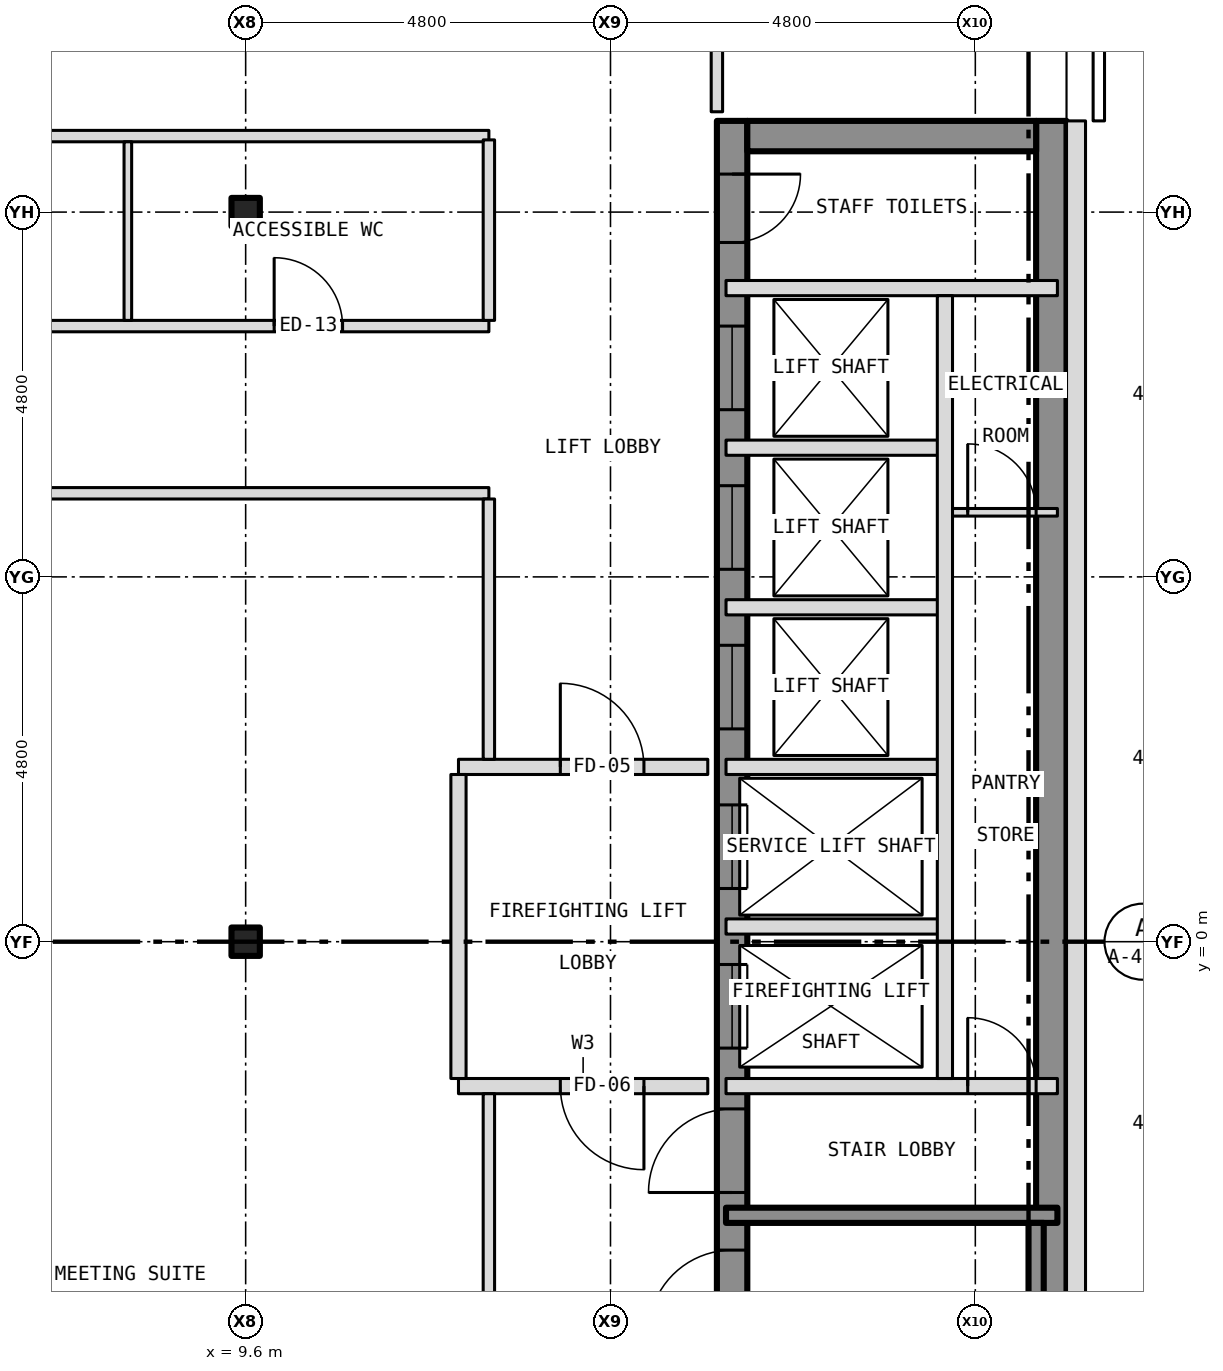
"""IFC4 building model, lengths in metres.
Left out: names, types, materials, properties, quantities, classifications, styles, units other than length and angle.
Written with IfcOpenShell. Run it as: python <this file> out.ifc"""

import sys

from ifc_helpers import new_model, si_unit, direction, frame, frame_2d, origin, origin_2d, place, context, subcontext, project, spatial, rectangle, i_section, extrude, element, fill, save


model = new_model("IFC4")
c1 = context("Model", 3, precision=1e-05, world=origin(), true_north=direction((0.0, 1.0)))
c2 = subcontext(c1, "Body", "Model", "MODEL_VIEW")
j1 = project(units=[si_unit("LENGTHUNIT", "METRE"), si_unit("PLANEANGLEUNIT", "RADIAN")], contexts=[c1])
p1 = place(None, origin())
s1 = spatial("IfcSite", under=j1, at=p1, CompositionType="ELEMENT")
p2 = place(p1, origin())
s2 = spatial("IfcBuilding", under=s1, at=p2, CompositionType="ELEMENT")
p3 = place(p2, frame((0.0, 0.0, 208.5)))
s3 = spatial("IfcBuildingStorey", under=s2, at=p3, CompositionType="ELEMENT", Elevation=208.5)
for number, where, z_axis, x_axis in (
    (1, (9.6, 0.0, -0.15), (0.0, 0.0, 1.0), (1.0, 0.0, 0.0)),
    (2, (9.6, 9.6, -0.15), (0.0, 0.0, 1.0), (1.0, 0.0, 0.0)),
):
    element("IfcColumn", number, at=place(p3, frame(where, z_axis=z_axis, x_axis=x_axis)), inside=s3, PredefinedType="COLUMN", context=c2, shape_type="SweptSolid", body=[
        extrude(i_section(OverallWidth=0.373, OverallDepth=0.373, WebThickness=0.016, FlangeThickness=0.026, at=origin_2d()), origin(), (0.0, 0.0, 1.0), 3.5),
    ])
p4 = place(p3, frame((16.0, -10.8, 0.0), z_axis=(0.0, 0.0, 1.0), x_axis=(0.0, 1.0, 0.0)))
e3 = element("IfcWall", 3, at=p4, inside=s3, PredefinedType="SHEAR", context=c2, shape_type="SweptSolid", body=[
    extrude(rectangle(XDim=21.6, YDim=0.4, at=frame_2d((10.8, 0.0))), origin(), (0.0, 0.0, 1.0), 3.25),
])
p5 = place(p4, frame((9.4, 0.0, 0.0)))
e4 = element("IfcOpeningElement", 4, at=p5, cuts=e3, PredefinedType="OPENING", context=c2, shape_type="SweptSolid", body=[
    extrude(rectangle(XDim=1.1, YDim=2.1, at=frame_2d((0.55, 1.05))), frame((0.0, 0.212, 0.0), z_axis=(0.0, -1.0, 0.0), x_axis=(1.0, 0.0, 0.0)), (0.0, 0.0, 1.0), 0.424),
])
p6 = place(p4, frame((11.5, 0.0, 0.0)))
e5 = element("IfcOpeningElement", 5, at=p6, cuts=e3, PredefinedType="OPENING", context=c2, shape_type="SweptSolid", body=[
    extrude(rectangle(XDim=1.1, YDim=2.1, at=frame_2d((0.55, 1.05))), frame((0.0, 0.212, 0.0), z_axis=(0.0, -1.0, 0.0), x_axis=(1.0, 0.0, 0.0)), (0.0, 0.0, 1.0), 0.424),
])
p7 = place(p4, frame((13.6, 0.0, 0.0)))
e6 = element("IfcOpeningElement", 6, at=p7, cuts=e3, PredefinedType="OPENING", context=c2, shape_type="SweptSolid", body=[
    extrude(rectangle(XDim=1.1, YDim=2.1, at=frame_2d((0.55, 1.05))), frame((0.0, 0.212, 0.0), z_axis=(0.0, -1.0, 0.0), x_axis=(1.0, 0.0, 0.0)), (0.0, 0.0, 1.0), 0.424),
])
p8 = place(p4, frame((15.7, 0.0, 0.0)))
e7 = element("IfcOpeningElement", 7, at=p8, cuts=e3, PredefinedType="OPENING", context=c2, shape_type="SweptSolid", body=[
    extrude(rectangle(XDim=1.1, YDim=2.1, at=frame_2d((0.55, 1.05))), frame((0.0, 0.212, 0.0), z_axis=(0.0, -1.0, 0.0), x_axis=(1.0, 0.0, 0.0)), (0.0, 0.0, 1.0), 0.424),
])
p9 = place(p4, frame((17.8, 0.0, 0.0)))
e8 = element("IfcOpeningElement", 8, at=p9, cuts=e3, PredefinedType="OPENING", context=c2, shape_type="SweptSolid", body=[
    extrude(rectangle(XDim=1.1, YDim=2.1, at=frame_2d((0.55, 1.05))), frame((0.0, 0.212, 0.0), z_axis=(0.0, -1.0, 0.0), x_axis=(1.0, 0.0, 0.0)), (0.0, 0.0, 1.0), 0.424),
])
p10 = place(p4, frame((5.642, 0.0, 0.0)))
e9 = element("IfcOpeningElement", 9, at=p10, cuts=e3, PredefinedType="OPENING", context=c2, shape_type="SweptSolid", body=[
    extrude(rectangle(XDim=1.1, YDim=2.1, at=frame_2d((0.55, 1.05))), frame((0.0, 0.212, 0.0), z_axis=(0.0, -1.0, 0.0), x_axis=(1.0, 0.0, 0.0)), (0.0, 0.0, 1.0), 0.424),
])
p11 = place(p4, frame((7.5, 0.0, 0.0)))
e10 = element("IfcOpeningElement", 10, at=p11, cuts=e3, PredefinedType="OPENING", context=c2, shape_type="SweptSolid", body=[
    extrude(rectangle(XDim=1.1, YDim=2.1, at=frame_2d((0.55, 1.05))), frame((0.0, 0.212, 0.0), z_axis=(0.0, -1.0, 0.0), x_axis=(1.0, 0.0, 0.0)), (0.0, 0.0, 1.0), 0.424),
])
p12 = place(p4, frame((20.0, 0.0, 0.0)))
e11 = element("IfcOpeningElement", 11, at=p12, cuts=e3, PredefinedType="OPENING", context=c2, shape_type="SweptSolid", body=[
    extrude(rectangle(XDim=0.9, YDim=2.1, at=frame_2d((0.45, 1.05))), frame((0.0, 0.212, 0.0), z_axis=(0.0, -1.0, 0.0), x_axis=(1.0, 0.0, 0.0)), (0.0, 0.0, 1.0), 0.424),
])
p13 = place(p3, frame((20.2, -10.8, 0.0), z_axis=(0.0, 0.0, 1.0), x_axis=(0.0, 1.0, 0.0)))
e12 = element("IfcWall", 12, at=p13, inside=s3, PredefinedType="SHEAR", context=c2, shape_type="SweptSolid", body=[
    extrude(rectangle(XDim=21.6, YDim=0.4, at=frame_2d((10.8, 0.0))), origin(), (0.0, 0.0, 1.0), 3.25),
])
p14 = place(p3, frame((16.2, 10.6, 0.0), z_axis=(0.0, 0.0, 1.0), x_axis=(1.0, 0.0, 0.0)))
e13 = element("IfcWall", 13, at=p14, inside=s3, PredefinedType="SHEAR", context=c2, shape_type="SweptSolid", body=[
    extrude(rectangle(XDim=3.8, YDim=0.4, at=frame_2d((1.9, 0.0))), origin(), (0.0, 0.0, 1.0), 3.25),
])
p15 = place(p3, frame((20.525, -10.8, 0.0), z_axis=(0.0, 0.0, 1.0), x_axis=(0.0, 1.0, 0.0)))
e14 = element("IfcWall", 14, at=p15, inside=s3, PredefinedType="SOLIDWALL", context=c2, shape_type="SweptSolid", body=[
    extrude(rectangle(XDim=21.6, YDim=0.25, at=frame_2d((10.8, 0.0))), origin(), (0.0, 0.0, 1.0), 3.5),
])
p16 = place(p15, frame((2.95, 0.0, 1.0)))
e15 = element("IfcOpeningElement", 15, at=p16, cuts=e14, PredefinedType="OPENING", context=c2, shape_type="SweptSolid", body=[
    extrude(rectangle(XDim=0.6, YDim=1.5, at=frame_2d((0.3, 0.75))), frame((0.0, 0.137, 0.0), z_axis=(0.0, -1.0, 0.0), x_axis=(1.0, 0.0, 0.0)), (0.0, 0.0, 1.0), 0.274),
])
p17 = place(p3, frame((15.92, -3.6, 0.0), z_axis=(0.0, 0.0, 1.0), x_axis=(1.0, 0.0, 0.0)))
e16 = element("IfcWall", 16, at=p17, inside=s3, PredefinedType="SHEAR", context=c2, shape_type="SweptSolid", body=[
    extrude(rectangle(XDim=4.36, YDim=0.2, at=frame_2d((2.18, 0.0))), origin(), (0.0, 0.0, 1.0), 3.25),
])
p18 = place(p3, frame((12.4, -1.9, 0.0), z_axis=(0.0, 0.0, 1.0), x_axis=(1.0, 0.0, 0.0)))
e17 = element("IfcWall", 17, at=p18, inside=s3, PredefinedType="PARTITIONING", context=c2, shape_type="SweptSolid", body=[
    extrude(rectangle(XDim=3.28, YDim=0.2, at=frame_2d((1.64, 0.0))), origin(), (0.0, 0.0, 1.0), 3.35),
])
p19 = place(p18, frame((1.34, 0.0, 0.0)))
e18 = element("IfcOpeningElement", 18, at=p19, cuts=e17, PredefinedType="OPENING", context=c2, shape_type="SweptSolid", body=[
    extrude(rectangle(XDim=1.1, YDim=2.1, at=frame_2d((0.55, 1.05))), frame((0.0, 0.112, 0.0), z_axis=(0.0, -1.0, 0.0), x_axis=(1.0, 0.0, 0.0)), (0.0, 0.0, 1.0), 0.224),
])
p20 = place(p3, frame((15.92, -1.9, 0.0), z_axis=(0.0, 0.0, 1.0), x_axis=(1.0, 0.0, 0.0)))
e19 = element("IfcWall", 19, at=p20, inside=s3, PredefinedType="PARTITIONING", context=c2, shape_type="SweptSolid", body=[
    extrude(rectangle(XDim=4.36, YDim=0.2, at=frame_2d((2.18, 0.0))), origin(), (0.0, 0.0, 1.0), 3.25),
])
p21 = place(p20, frame((3.18, 0.0, 0.0)))
e20 = element("IfcOpeningElement", 20, at=p21, cuts=e19, PredefinedType="OPENING", context=c2, shape_type="SweptSolid", body=[
    extrude(rectangle(XDim=0.9, YDim=2.1, at=frame_2d((0.45, 1.05))), frame((0.0, 0.112, 0.0), z_axis=(0.0, -1.0, 0.0), x_axis=(1.0, 0.0, 0.0)), (0.0, 0.0, 1.0), 0.224),
])
p22 = place(p3, frame((15.92, 0.2, 0.0), z_axis=(0.0, 0.0, 1.0), x_axis=(1.0, 0.0, 0.0)))
e21 = element("IfcWall", 21, at=p22, inside=s3, PredefinedType="PARTITIONING", context=c2, shape_type="SweptSolid", body=[
    extrude(rectangle(XDim=2.88, YDim=0.2, at=frame_2d((1.44, 0.0))), origin(), (0.0, 0.0, 1.0), 3.25),
])
p23 = place(p3, frame((12.4, 2.3, 0.0), z_axis=(0.0, 0.0, 1.0), x_axis=(1.0, 0.0, 0.0)))
e22 = element("IfcWall", 22, at=p23, inside=s3, PredefinedType="PARTITIONING", context=c2, shape_type="SweptSolid", body=[
    extrude(rectangle(XDim=3.28, YDim=0.2, at=frame_2d((1.64, 0.0))), origin(), (0.0, 0.0, 1.0), 3.35),
])
p24 = place(p23, frame((1.34, 0.0, 0.0)))
e23 = element("IfcOpeningElement", 23, at=p24, cuts=e22, PredefinedType="OPENING", context=c2, shape_type="SweptSolid", body=[
    extrude(rectangle(XDim=1.1, YDim=2.1, at=frame_2d((0.55, 1.05))), frame((0.0, 0.112, 0.0), z_axis=(0.0, -1.0, 0.0), x_axis=(1.0, 0.0, 0.0)), (0.0, 0.0, 1.0), 0.224),
])
for number, where, z_axis, x_axis in (
    (24, (15.92, 2.3, 0.0), (0.0, 0.0, 1.0), (1.0, 0.0, 0.0)),
    (25, (15.92, 4.4, 0.0), (0.0, 0.0, 1.0), (1.0, 0.0, 0.0)),
):
    element("IfcWall", number, at=place(p3, frame(where, z_axis=z_axis, x_axis=x_axis)), inside=s3, PredefinedType="PARTITIONING", context=c2, shape_type="SweptSolid", body=[
        extrude(rectangle(XDim=2.88, YDim=0.2, at=frame_2d((1.44, 0.0))), origin(), (0.0, 0.0, 1.0), 3.25),
    ])
p25 = place(p3, frame((18.8, 5.65, 0.0), z_axis=(0.0, 0.0, 1.0), x_axis=(1.0, 0.0, 0.0)))
e26 = element("IfcWall", 26, at=p25, inside=s3, PredefinedType="PARTITIONING", context=c2, shape_type="SweptSolid", body=[
    extrude(rectangle(XDim=1.48, YDim=0.1, at=frame_2d((0.74, 0.0))), origin(), (0.0, 0.0, 1.0), 3.25),
])
p26 = place(p25, frame((0.3, 0.0, 0.0)))
e27 = element("IfcOpeningElement", 27, at=p26, cuts=e26, PredefinedType="OPENING", context=c2, shape_type="SweptSolid", body=[
    extrude(rectangle(XDim=0.9, YDim=2.1, at=frame_2d((0.45, 1.05))), frame((0.0, 0.062, 0.0), z_axis=(0.0, -1.0, 0.0), x_axis=(1.0, 0.0, 0.0)), (0.0, 0.0, 1.0), 0.124),
])
p27 = place(p3, frame((3.3, 5.9, 0.0), z_axis=(0.0, 0.0, 1.0), x_axis=(1.0, 0.0, 0.0)))
e28 = element("IfcWall", 28, at=p27, inside=s3, PredefinedType="PARTITIONING", context=c2, shape_type="SweptSolid", body=[
    extrude(rectangle(XDim=9.5, YDim=0.15, at=frame_2d((4.75, 0.0))), origin(), (0.0, 0.0, 1.0), 3.35),
])
p28 = place(p3, frame((15.92, 6.5, 0.0), z_axis=(0.0, 0.0, 1.0), x_axis=(1.0, 0.0, 0.0)))
e29 = element("IfcWall", 29, at=p28, inside=s3, PredefinedType="PARTITIONING", context=c2, shape_type="SweptSolid", body=[
    extrude(rectangle(XDim=2.88, YDim=0.2, at=frame_2d((1.44, 0.0))), origin(), (0.0, 0.0, 1.0), 3.25),
])
p29 = place(p3, frame((3.3, 8.1, 0.0), z_axis=(0.0, 0.0, 1.0), x_axis=(1.0, 0.0, 0.0)))
e30 = element("IfcWall", 30, at=p29, inside=s3, PredefinedType="PARTITIONING", context=c2, shape_type="SweptSolid", body=[
    extrude(rectangle(XDim=9.5, YDim=0.15, at=frame_2d((4.75, 0.0))), origin(), (0.0, 0.0, 1.0), 3.35),
])
p30 = place(p29, frame((6.675, 0.0, 0.0)))
e31 = element("IfcOpeningElement", 31, at=p30, cuts=e30, PredefinedType="OPENING", context=c2, shape_type="SweptSolid", body=[
    extrude(rectangle(XDim=0.9, YDim=2.1, at=frame_2d((0.45, 1.05))), frame((0.0, 0.087, 0.0), z_axis=(0.0, -1.0, 0.0), x_axis=(1.0, 0.0, 0.0)), (0.0, 0.0, 1.0), 0.174),
])
p31 = place(p3, frame((15.92, 8.6, 0.0), z_axis=(0.0, 0.0, 1.0), x_axis=(1.0, 0.0, 0.0)))
e32 = element("IfcWall", 32, at=p31, inside=s3, PredefinedType="PARTITIONING", context=c2, shape_type="SweptSolid", body=[
    extrude(rectangle(XDim=4.36, YDim=0.2, at=frame_2d((2.18, 0.0))), origin(), (0.0, 0.0, 1.0), 3.25),
])
p32 = place(p3, frame((3.3, 10.6, 0.0), z_axis=(0.0, 0.0, 1.0), x_axis=(1.0, 0.0, 0.0)))
e33 = element("IfcWall", 33, at=p32, inside=s3, PredefinedType="PARTITIONING", context=c2, shape_type="SweptSolid", body=[
    extrude(rectangle(XDim=9.5, YDim=0.15, at=frame_2d((4.75, 0.0))), origin(), (0.0, 0.0, 1.0), 3.35),
])
p33 = place(p32, frame((1.925, 0.0, 0.0)))
e34 = element("IfcOpeningElement", 34, at=p33, cuts=e33, PredefinedType="OPENING", context=c2, shape_type="SweptSolid", body=[
    extrude(rectangle(XDim=0.9, YDim=2.1, at=frame_2d((0.45, 1.05))), frame((0.0, 0.087, 0.0), z_axis=(0.0, -1.0, 0.0), x_axis=(1.0, 0.0, 0.0)), (0.0, 0.0, 1.0), 0.174),
])
p34 = place(p3, frame((8.05, 8.175, 0.0), z_axis=(0.0, 0.0, 1.0), x_axis=(0.0, 1.0, 0.0)))
e35 = element("IfcWall", 35, at=p34, inside=s3, PredefinedType="PARTITIONING", context=c2, shape_type="SweptSolid", body=[
    extrude(rectangle(XDim=2.35, YDim=0.1, at=frame_2d((1.175, 0.0))), origin(), (0.0, 0.0, 1.0), 3.35),
])
p35 = place(p3, frame((12.4, -1.8, 0.0), z_axis=(0.0, 0.0, 1.0), x_axis=(0.0, 1.0, 0.0)))
e36 = element("IfcWall", 36, at=p35, inside=s3, PredefinedType="PARTITIONING", context=c2, shape_type="SweptSolid", body=[
    extrude(rectangle(XDim=4.0, YDim=0.2, at=frame_2d((2.0, 0.0))), origin(), (0.0, 0.0, 1.0), 3.35),
])
p36 = place(p3, frame((12.8, -10.525, 0.0), z_axis=(0.0, 0.0, 1.0), x_axis=(0.0, 1.0, 0.0)))
e37 = element("IfcWall", 37, at=p36, inside=s3, PredefinedType="PARTITIONING", context=c2, shape_type="SweptSolid", body=[
    extrude(rectangle(XDim=8.525, YDim=0.15, at=frame_2d((4.262, 0.0))), origin(), (0.0, 0.0, 1.0), 3.35),
])
p37 = place(p3, frame((12.8, 2.4, 0.0), z_axis=(0.0, 0.0, 1.0), x_axis=(0.0, 1.0, 0.0)))
e38 = element("IfcWall", 38, at=p37, inside=s3, PredefinedType="PARTITIONING", context=c2, shape_type="SweptSolid", body=[
    extrude(rectangle(XDim=3.425, YDim=0.15, at=frame_2d((1.712, 0.0))), origin(), (0.0, 0.0, 1.0), 3.35),
])
p38 = place(p3, frame((12.8, 8.175, 0.0), z_axis=(0.0, 0.0, 1.0), x_axis=(0.0, 1.0, 0.0)))
e39 = element("IfcWall", 39, at=p38, inside=s3, PredefinedType="PARTITIONING", context=c2, shape_type="SweptSolid", body=[
    extrude(rectangle(XDim=2.375, YDim=0.15, at=frame_2d((1.188, 0.0))), origin(), (0.0, 0.0, 1.0), 3.35),
])
p39 = place(p3, frame((15.8, 10.92, 0.0), z_axis=(0.0, 0.0, 1.0), x_axis=(0.0, 1.0, 0.0)))
e40 = element("IfcWall", 40, at=p39, inside=s3, PredefinedType="PARTITIONING", context=c2, shape_type="SweptSolid", body=[
    extrude(rectangle(XDim=1.805, YDim=0.15, at=frame_2d((0.903, 0.0))), origin(), (0.0, 0.0, 1.0), 3.35),
])
p40 = place(p3, frame((18.8, -1.8, 0.0), z_axis=(0.0, 0.0, 1.0), x_axis=(0.0, 1.0, 0.0)))
e41 = element("IfcWall", 41, at=p40, inside=s3, PredefinedType="PARTITIONING", context=c2, shape_type="SweptSolid", body=[
    extrude(rectangle(XDim=10.3, YDim=0.2, at=frame_2d((5.15, 0.0))), origin(), (0.0, 0.0, 1.0), 3.25),
])
p41 = place(p3, frame((20.0, -10.68, 0.0), z_axis=(0.0, 0.0, 1.0), x_axis=(0.0, 1.0, 0.0)))
e42 = element("IfcWall", 42, at=p41, inside=s3, PredefinedType="SHEAR", context=c2, shape_type="SweptSolid", body=[
    extrude(rectangle(XDim=6.98, YDim=0.2, at=frame_2d((3.49, 0.0))), origin(), (0.0, 0.0, 1.0), 3.25),
])
p42 = place(p5, origin())
e43 = element("IfcDoor", 43, at=p42, inside=s3, OperationType="SLIDING_TO_LEFT", PredefinedType="DOOR", context=c2, shape_type="SweptSolid", body=[
    extrude(rectangle(XDim=1.1, YDim=2.1, at=frame_2d((0.55, 1.05))), frame((0.0, 0.025, 0.0), z_axis=(0.0, -1.0, 0.0), x_axis=(1.0, 0.0, 0.0)), (0.0, 0.0, 1.0), 0.05),
])
fill(e4, e43)
p43 = place(p6, origin())
e44 = element("IfcDoor", 44, at=p43, inside=s3, OperationType="SLIDING_TO_LEFT", PredefinedType="DOOR", context=c2, shape_type="SweptSolid", body=[
    extrude(rectangle(XDim=1.1, YDim=2.1, at=frame_2d((0.55, 1.05))), frame((0.0, 0.025, 0.0), z_axis=(0.0, -1.0, 0.0), x_axis=(1.0, 0.0, 0.0)), (0.0, 0.0, 1.0), 0.05),
])
fill(e5, e44)
p44 = place(p7, origin())
e45 = element("IfcDoor", 45, at=p44, inside=s3, OperationType="SLIDING_TO_LEFT", PredefinedType="DOOR", context=c2, shape_type="SweptSolid", body=[
    extrude(rectangle(XDim=1.1, YDim=2.1, at=frame_2d((0.55, 1.05))), frame((0.0, 0.025, 0.0), z_axis=(0.0, -1.0, 0.0), x_axis=(1.0, 0.0, 0.0)), (0.0, 0.0, 1.0), 0.05),
])
fill(e6, e45)
p45 = place(p8, origin())
e46 = element("IfcDoor", 46, at=p45, inside=s3, OperationType="SLIDING_TO_LEFT", PredefinedType="DOOR", context=c2, shape_type="SweptSolid", body=[
    extrude(rectangle(XDim=1.1, YDim=2.1, at=frame_2d((0.55, 1.05))), frame((0.0, 0.025, 0.0), z_axis=(0.0, -1.0, 0.0), x_axis=(1.0, 0.0, 0.0)), (0.0, 0.0, 1.0), 0.05),
])
fill(e7, e46)
p46 = place(p9, origin())
e47 = element("IfcDoor", 47, at=p46, inside=s3, OperationType="SLIDING_TO_LEFT", PredefinedType="DOOR", context=c2, shape_type="SweptSolid", body=[
    extrude(rectangle(XDim=1.1, YDim=2.1, at=frame_2d((0.55, 1.05))), frame((0.0, 0.025, 0.0), z_axis=(0.0, -1.0, 0.0), x_axis=(1.0, 0.0, 0.0)), (0.0, 0.0, 1.0), 0.05),
])
fill(e8, e47)
p47 = place(p10, origin())
e48 = element("IfcDoor", 48, at=p47, inside=s3, OperationType="SINGLE_SWING_LEFT", PredefinedType="DOOR", context=c2, shape_type="SweptSolid", body=[
    extrude(rectangle(XDim=1.1, YDim=2.1, at=frame_2d((0.55, 1.05))), frame((0.0, 0.025, 0.0), z_axis=(0.0, -1.0, 0.0), x_axis=(1.0, 0.0, 0.0)), (0.0, 0.0, 1.0), 0.05),
])
fill(e9, e48)
p48 = place(p11, origin())
e49 = element("IfcDoor", 49, at=p48, inside=s3, OperationType="SINGLE_SWING_LEFT", PredefinedType="DOOR", context=c2, shape_type="SweptSolid", body=[
    extrude(rectangle(XDim=1.1, YDim=2.1, at=frame_2d((0.55, 1.05))), frame((0.0, 0.025, 0.0), z_axis=(0.0, -1.0, 0.0), x_axis=(1.0, 0.0, 0.0)), (0.0, 0.0, 1.0), 0.05),
])
fill(e10, e49)
p49 = place(p12, origin())
e50 = element("IfcDoor", 50, at=p49, inside=s3, OperationType="SINGLE_SWING_RIGHT", PredefinedType="DOOR", context=c2, shape_type="SweptSolid", body=[
    extrude(rectangle(XDim=0.9, YDim=2.1, at=frame_2d((0.45, 1.05))), frame((0.0, 0.025, 0.0), z_axis=(0.0, -1.0, 0.0), x_axis=(1.0, 0.0, 0.0)), (0.0, 0.0, 1.0), 0.05),
])
fill(e11, e50)
p50 = place(p21, origin())
e51 = element("IfcDoor", 51, at=p50, inside=s3, OperationType="SINGLE_SWING_LEFT", PredefinedType="DOOR", context=c2, shape_type="SweptSolid", body=[
    extrude(rectangle(XDim=0.9, YDim=2.1, at=frame_2d((0.45, 1.05))), frame((0.0, 0.025, 0.0), z_axis=(0.0, -1.0, 0.0), x_axis=(1.0, 0.0, 0.0)), (0.0, 0.0, 1.0), 0.05),
])
fill(e20, e51)
p51 = place(p26, origin())
e52 = element("IfcDoor", 52, at=p51, inside=s3, OperationType="SINGLE_SWING_LEFT", PredefinedType="DOOR", context=c2, shape_type="SweptSolid", body=[
    extrude(rectangle(XDim=0.9, YDim=2.1, at=frame_2d((0.45, 1.05))), frame((0.0, 0.025, 0.0), z_axis=(0.0, -1.0, 0.0), x_axis=(1.0, 0.0, 0.0)), (0.0, 0.0, 1.0), 0.05),
])
fill(e27, e52)
p52 = place(p24, origin())
e53 = element("IfcDoor", 53, at=p52, inside=s3, OperationType="SINGLE_SWING_LEFT", PredefinedType="DOOR", context=c2, shape_type="SweptSolid", body=[
    extrude(rectangle(XDim=1.1, YDim=2.1, at=frame_2d((0.55, 1.05))), frame((0.0, 0.025, 0.0), z_axis=(0.0, -1.0, 0.0), x_axis=(1.0, 0.0, 0.0)), (0.0, 0.0, 1.0), 0.05),
])
fill(e23, e53)
p53 = place(p19, origin())
e54 = element("IfcDoor", 54, at=p53, inside=s3, OperationType="SINGLE_SWING_RIGHT", PredefinedType="DOOR", context=c2, shape_type="SweptSolid", body=[
    extrude(rectangle(XDim=1.1, YDim=2.1, at=frame_2d((0.55, 1.05))), frame((0.0, 0.025, 0.0), z_axis=(0.0, -1.0, 0.0), x_axis=(1.0, 0.0, 0.0)), (0.0, 0.0, 1.0), 0.05),
])
fill(e18, e54)
p54 = place(p30, origin())
e55 = element("IfcDoor", 55, at=p54, inside=s3, OperationType="SINGLE_SWING_LEFT", PredefinedType="DOOR", context=c2, shape_type="SweptSolid", body=[
    extrude(rectangle(XDim=0.9, YDim=2.1, at=frame_2d((0.45, 1.05))), frame((0.0, 0.025, 0.0), z_axis=(0.0, -1.0, 0.0), x_axis=(1.0, 0.0, 0.0)), (0.0, 0.0, 1.0), 0.05),
])
fill(e31, e55)
save(model, sys.argv[1])
